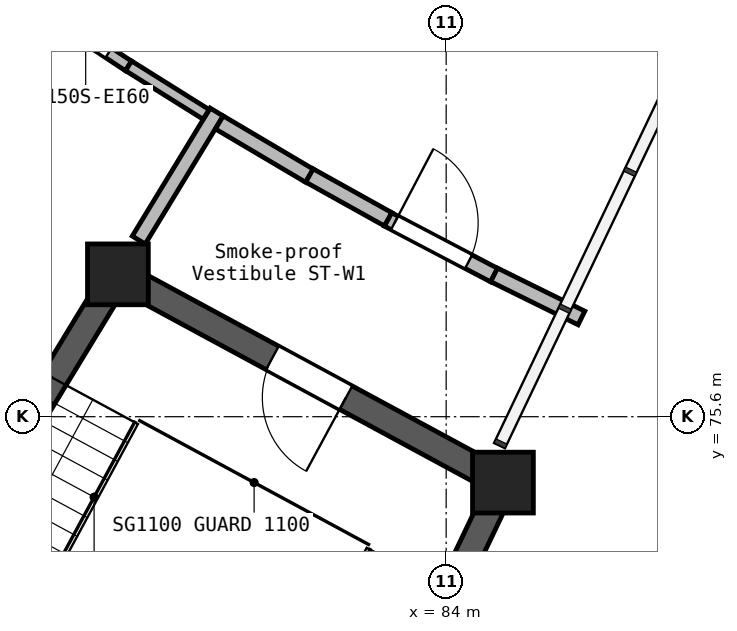
"""IFC4 building model, lengths in metres.
Left out: names, types, materials, properties, quantities, classifications, styles, units other than length and angle.
Written with IfcOpenShell. Run it as: python <this file> out.ifc"""

import sys

from ifc_helpers import new_model, si_unit, direction, frame, frame_2d, origin, origin_2d, place, context, subcontext, project, spatial, rectangle, extrude, element, fill, save


model = new_model("IFC4")
c1 = context("Model", 3, precision=1e-05, world=origin(), true_north=direction((0.0, 1.0)))
c2 = subcontext(c1, "Body", "Model", "MODEL_VIEW")
j1 = project(units=[si_unit("LENGTHUNIT", "METRE"), si_unit("PLANEANGLEUNIT", "RADIAN")], contexts=[c1])
p1 = place(None, origin())
s1 = spatial("IfcSite", under=j1, at=p1, CompositionType="ELEMENT")
p2 = place(p1, origin())
s2 = spatial("IfcBuilding", under=s1, at=p2, CompositionType="ELEMENT")
p3 = place(p2, frame((0.0, 0.0, 9.9)))
s3 = spatial("IfcBuildingStorey", under=s2, at=p3, CompositionType="ELEMENT", Elevation=9.9)
for number, where, z_axis, x_axis in (
    (1, (79.681, 77.473, 0.0), (0.0, 0.0, 1.0), (1.0, 0.0, 0.0)),
    (2, (84.747, 74.733, 0.0), (0.0, 0.0, 1.0), (1.0, 0.0, 0.0)),
):
    element("IfcColumn", number, at=place(p3, frame(where, z_axis=z_axis, x_axis=x_axis)), inside=s3, PredefinedType="COLUMN", context=c2, shape_type="SweptSolid", body=[
        extrude(rectangle(XDim=0.8, YDim=0.8, at=origin_2d()), origin(), (0.0, 0.0, 1.0), 2.7),
    ])
p4 = place(p3, frame((75.848, 71.173, 0.0), z_axis=(0.0, 0.0, 1.0), x_axis=(0.51973149438, 0.854329663391, 0.0)))
e3 = element("IfcWall", 3, at=p4, inside=s3, PredefinedType="SHEAR", context=c2, shape_type="SweptSolid", body=[
    extrude(rectangle(XDim=7.55, YDim=0.35, at=frame_2d((3.775, 0.0))), origin(), (0.0, 0.0, 1.0), 2.7),
])
p5 = place(p3, frame((81.572, 68.077, 0.0), z_axis=(0.0, 0.0, 1.0), x_axis=(0.430592498036, 0.90254645345, 0.0)))
e4 = element("IfcWall", 4, at=p5, inside=s3, PredefinedType="SHEAR", context=c2, shape_type="SweptSolid", body=[
    extrude(rectangle(XDim=7.55, YDim=0.35, at=frame_2d((3.775, 0.0))), origin(), (0.0, 0.0, 1.0), 2.7),
])
p6 = place(p3, frame((84.593, 74.816, 0.0), z_axis=(0.0, 0.0, 1.0), x_axis=(-0.879585553739, 0.475740742058, 0.0)))
e5 = element("IfcWall", 5, at=p6, inside=s3, PredefinedType="SHEAR", context=c2, shape_type="SweptSolid", body=[
    extrude(rectangle(XDim=5.409, YDim=0.35, at=frame_2d((2.705, 0.0))), origin(), (0.0, 0.0, 1.0), 2.7),
])
p7 = place(p6, frame((2.174, 0.0, 0.0)))
e6 = element("IfcOpeningElement", 6, at=p7, cuts=e5, PredefinedType="OPENING", context=c2, shape_type="SweptSolid", body=[
    extrude(rectangle(XDim=1.1, YDim=2.1, at=frame_2d((0.55, 1.05))), frame((0.0, 0.185, 0.0), z_axis=(0.0, -1.0, 0.0), x_axis=(1.0, 0.0, 0.0)), (0.0, 0.0, 1.0), 0.37),
])
p8 = place(p3, frame((79.955, 77.924, 0.0), z_axis=(0.0, 0.0, 1.0), x_axis=(0.519675881268, 0.85436349315, 0.0)))
e7 = element("IfcWall", 7, at=p8, inside=s3, PredefinedType="SOLIDWALL", context=c2, shape_type="SweptSolid", body=[
    extrude(rectangle(XDim=1.972, YDim=0.2, at=frame_2d((0.986, 0.0))), origin(), (0.0, 0.0, 1.0), 2.45),
])
p9 = place(p3, frame((83.232, 78.197, 0.0), z_axis=(0.0, 0.0, 1.0), x_axis=(0.885510751813, -0.464618885134, 0.0)))
e8 = element("IfcWall", 8, at=p9, inside=s3, PredefinedType="SOLIDWALL", context=c2, shape_type="SweptSolid", body=[
    extrude(rectangle(XDim=1.58, YDim=0.2, at=frame_2d((0.79, 0.0))), origin(), (0.0, 0.0, 1.0), 2.45),
])
p10 = place(p9, frame((0.1, 0.0, 0.0)))
e9 = element("IfcOpeningElement", 9, at=p10, cuts=e8, PredefinedType="OPENING", context=c2, shape_type="SweptSolid", body=[
    extrude(rectangle(XDim=1.1, YDim=2.1, at=frame_2d((0.55, 1.05))), frame((0.0, 0.11, 0.0), z_axis=(0.0, -1.0, 0.0), x_axis=(1.0, 0.0, 0.0)), (0.0, 0.0, 1.0), 0.22),
])
p11 = place(p3, frame((81.015, 79.471, 0.0), z_axis=(0.0, 0.0, 1.0), x_axis=(0.860926528214, -0.508729312127, 0.0)))
e10 = element("IfcWall", 10, at=p11, inside=s3, PredefinedType="SOLIDWALL", context=c2, shape_type="SweptSolid", body=[
    extrude(rectangle(XDim=1.379, YDim=0.2, at=frame_2d((0.689, 0.0))), origin(), (0.0, 0.0, 1.0), 2.45),
])
p12 = place(p3, frame((84.631, 77.466, 0.0), z_axis=(0.0, 0.0, 1.0), x_axis=(0.896852237177, -0.442330266509, 0.0)))
e11 = element("IfcWall", 11, at=p12, inside=s3, PredefinedType="SOLIDWALL", context=c2, shape_type="SweptSolid", body=[
    extrude(rectangle(XDim=1.281, YDim=0.2, at=frame_2d((0.641, 0.0))), origin(), (0.0, 0.0, 1.0), 2.45),
])
p13 = place(p3, frame((82.201, 78.774, 0.0), z_axis=(0.0, 0.0, 1.0), x_axis=(0.873621822139, -0.486605499232, 0.0)))
e12 = element("IfcWall", 12, at=p13, inside=s3, PredefinedType="SOLIDWALL", context=c2, shape_type="SweptSolid", body=[
    extrude(rectangle(XDim=1.184, YDim=0.2, at=frame_2d((0.592, 0.0))), origin(), (0.0, 0.0, 1.0), 2.45),
])
p14 = place(p3, frame((78.692, 80.96, 0.0), z_axis=(0.0, 0.0, 1.0), x_axis=(0.834207926362, -0.551450030007, 0.0)))
e13 = element("IfcWall", 13, at=p14, inside=s3, PredefinedType="PARTITIONING", context=c2, shape_type="SweptSolid", body=[
    extrude(rectangle(XDim=1.354, YDim=0.15, at=frame_2d((0.677, 0.0))), origin(), (0.0, 0.0, 1.0), 2.45),
])
p15 = place(p14, frame((0.139, 0.0, 0.0)))
e14 = element("IfcOpeningElement", 14, at=p15, cuts=e13, PredefinedType="OPENING", context=c2, shape_type="SweptSolid", body=[
    extrude(rectangle(XDim=0.9, YDim=2.1, at=frame_2d((0.45, 1.05))), frame((0.0, 0.085, 0.0), z_axis=(0.0, -1.0, 0.0), x_axis=(1.0, 0.0, 0.0)), (0.0, 0.0, 1.0), 0.17),
])
p16 = place(p3, frame((79.821, 80.216, 0.0), z_axis=(0.0, 0.0, 1.0), x_axis=(0.847587948991, -0.530654943184, 0.0)))
e15 = element("IfcWall", 15, at=p16, inside=s3, PredefinedType="PARTITIONING", context=c2, shape_type="SweptSolid", body=[
    extrude(rectangle(XDim=1.204, YDim=0.15, at=frame_2d((0.602, 0.0))), origin(), (0.0, 0.0, 1.0), 2.45),
])
p17 = place(p15, frame((0.9, 0.0, 0.0), z_axis=(0.0, 0.0, 1.0), x_axis=(-1.0, 0.0, 0.0)))
e16 = element("IfcDoor", 16, at=p17, inside=s3, OperationType="SINGLE_SWING_RIGHT", PredefinedType="DOOR", context=c2, shape_type="SweptSolid", body=[
    extrude(rectangle(XDim=0.9, YDim=2.1, at=frame_2d((0.45, 1.05))), frame((0.0, 0.025, 0.0), z_axis=(0.0, -1.0, 0.0), x_axis=(1.0, 0.0, 0.0)), (0.0, 0.0, 1.0), 0.05),
])
fill(e14, e16)
p18 = place(p7, origin())
e17 = element("IfcDoor", 17, at=p18, inside=s3, OperationType="SINGLE_SWING_RIGHT", PredefinedType="DOOR", context=c2, shape_type="SweptSolid", body=[
    extrude(rectangle(XDim=1.1, YDim=2.1, at=frame_2d((0.55, 1.05))), frame((0.0, 0.025, 0.0), z_axis=(0.0, -1.0, 0.0), x_axis=(1.0, 0.0, 0.0)), (0.0, 0.0, 1.0), 0.05),
])
fill(e6, e17)
p19 = place(p10, frame((1.1, 0.0, 0.0), z_axis=(0.0, 0.0, 1.0), x_axis=(-1.0, 0.0, 0.0)))
e18 = element("IfcDoor", 18, at=p19, inside=s3, OperationType="SINGLE_SWING_RIGHT", PredefinedType="DOOR", context=c2, shape_type="SweptSolid", body=[
    extrude(rectangle(XDim=1.1, YDim=2.1, at=frame_2d((0.55, 1.05))), frame((0.0, 0.025, 0.0), z_axis=(0.0, -1.0, 0.0), x_axis=(1.0, 0.0, 0.0)), (0.0, 0.0, 1.0), 0.05),
])
fill(e9, e18)
save(model, sys.argv[1])
